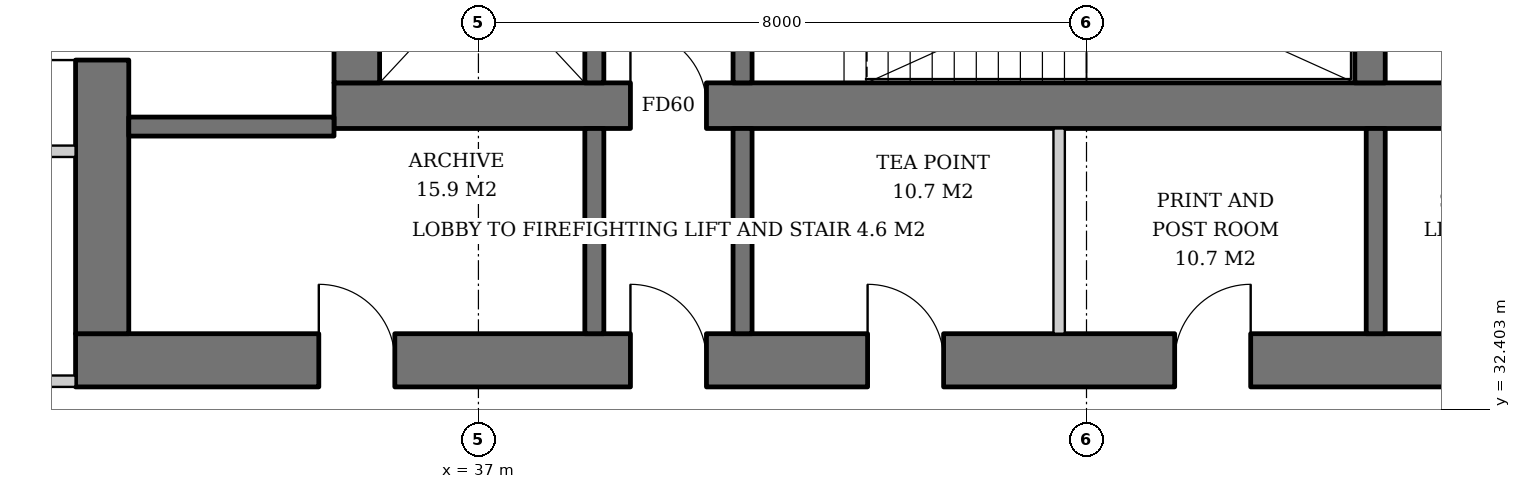
"""IFC4 building model, lengths in metres.
Left out: names, types, materials, properties, quantities, classifications, styles, units other than length and angle.
Written with IfcOpenShell. Run it as: python <this file> out.ifc"""

import sys

from ifc_helpers import new_model, si_unit, direction, frame, frame_2d, origin, place, context, subcontext, project, spatial, rectangle, extrude, element, fill, save


model = new_model("IFC4")
c1 = context("Model", 3, precision=1e-05, world=origin(), true_north=direction((0.0, 1.0)))
c2 = subcontext(c1, "Body", "Model", "MODEL_VIEW")
j1 = project(units=[si_unit("LENGTHUNIT", "METRE"), si_unit("PLANEANGLEUNIT", "RADIAN")], contexts=[c1])
p1 = place(None, origin())
s1 = spatial("IfcSite", under=j1, at=p1, CompositionType="ELEMENT")
p2 = place(p1, origin())
s2 = spatial("IfcBuilding", under=s1, at=p2, CompositionType="ELEMENT")
p3 = place(p2, frame((0.0, 0.0, 100.8)))
s3 = spatial("IfcBuildingStorey", under=s2, at=p3, CompositionType="ELEMENT", Elevation=100.8)
p4 = place(p3, frame((35.1, 36.4, 0.0), z_axis=(0.0, 0.0, 1.0), x_axis=(1.0, 0.0, 0.0)))
e1 = element("IfcWall", 1, at=p4, inside=s3, PredefinedType="SHEAR", context=c2, shape_type="SweptSolid", body=[
    extrude(rectangle(XDim=19.8, YDim=0.6, at=frame_2d((9.9, 0.0))), origin(), (0.0, 0.0, 1.0), 3.8),
])
p5 = place(p4, frame((3.9, 0.0, 0.0)))
e2 = element("IfcOpeningElement", 2, at=p5, cuts=e1, PredefinedType="OPENING", context=c2, shape_type="SweptSolid", body=[
    extrude(rectangle(XDim=1.0, YDim=2.1, at=frame_2d((0.5, 1.05))), frame((0.0, 0.31, 0.0), z_axis=(0.0, -1.0, 0.0), x_axis=(1.0, 0.0, 0.0)), (0.0, 0.0, 1.0), 0.62),
])
p6 = place(p4, frame((15.35, 0.0, 0.0)))
e3 = element("IfcOpeningElement", 3, at=p6, cuts=e1, PredefinedType="OPENING", context=c2, shape_type="SweptSolid", body=[
    extrude(rectangle(XDim=1.0, YDim=2.1, at=frame_2d((0.5, 1.05))), frame((0.0, 0.31, 0.0), z_axis=(0.0, -1.0, 0.0), x_axis=(1.0, 0.0, 0.0)), (0.0, 0.0, 1.0), 0.62),
])
p7 = place(p3, frame((35.4, 36.7, 0.0), z_axis=(0.0, 0.0, 1.0), x_axis=(0.0, 1.0, 0.0)))
e4 = element("IfcWall", 4, at=p7, inside=s3, PredefinedType="SHEAR", context=c2, shape_type="SweptSolid", body=[
    extrude(rectangle(XDim=18.6, YDim=0.6, at=frame_2d((9.3, 0.0))), origin(), (0.0, 0.0, 1.0), 3.8),
])
p8 = place(p7, frame((8.4, 0.0, 0.0)))
e5 = element("IfcOpeningElement", 5, at=p8, cuts=e4, PredefinedType="OPENING", context=c2, shape_type="SweptSolid", body=[
    extrude(rectangle(XDim=1.8, YDim=2.4, at=frame_2d((0.9, 1.2))), frame((0.0, 0.31, 0.0), z_axis=(0.0, -1.0, 0.0), x_axis=(1.0, 0.0, 0.0)), (0.0, 0.0, 1.0), 0.62),
])
p9 = place(p3, frame((31.7, 33.05, 0.0), z_axis=(0.0, 0.0, 1.0), x_axis=(1.0, 0.0, 0.0)))
e6 = element("IfcWall", 6, at=p9, inside=s3, PredefinedType="SHEAR", context=c2, shape_type="SweptSolid", body=[
    extrude(rectangle(XDim=26.6, YDim=0.7, at=frame_2d((13.3, 0.0))), origin(), (0.0, 0.0, 1.0), 3.8),
])
p10 = place(p9, frame((7.3, 0.0, 0.0)))
e7 = element("IfcOpeningElement", 7, at=p10, cuts=e6, PredefinedType="OPENING", context=c2, shape_type="SweptSolid", body=[
    extrude(rectangle(XDim=1.0, YDim=2.1, at=frame_2d((0.5, 1.05))), frame((0.0, 0.36, 0.0), z_axis=(0.0, -1.0, 0.0), x_axis=(1.0, 0.0, 0.0)), (0.0, 0.0, 1.0), 0.72),
])
p11 = place(p9, frame((18.75, 0.0, 0.0)))
e8 = element("IfcOpeningElement", 8, at=p11, cuts=e6, PredefinedType="OPENING", context=c2, shape_type="SweptSolid", body=[
    extrude(rectangle(XDim=1.0, YDim=2.1, at=frame_2d((0.5, 1.05))), frame((0.0, 0.36, 0.0), z_axis=(0.0, -1.0, 0.0), x_axis=(1.0, 0.0, 0.0)), (0.0, 0.0, 1.0), 0.72),
])
p12 = place(p9, frame((3.2, 0.0, 0.0)))
e9 = element("IfcOpeningElement", 9, at=p12, cuts=e6, PredefinedType="OPENING", context=c2, shape_type="SweptSolid", body=[
    extrude(rectangle(XDim=1.0, YDim=2.1, at=frame_2d((0.5, 1.05))), frame((0.0, 0.36, 0.0), z_axis=(0.0, -1.0, 0.0), x_axis=(1.0, 0.0, 0.0)), (0.0, 0.0, 1.0), 0.72),
])
p13 = place(p9, frame((10.42, 0.0, 0.0)))
e10 = element("IfcOpeningElement", 10, at=p13, cuts=e6, PredefinedType="OPENING", context=c2, shape_type="SweptSolid", body=[
    extrude(rectangle(XDim=1.0, YDim=2.1, at=frame_2d((0.5, 1.05))), frame((0.0, 0.36, 0.0), z_axis=(0.0, -1.0, 0.0), x_axis=(1.0, 0.0, 0.0)), (0.0, 0.0, 1.0), 0.72),
])
p14 = place(p9, frame((14.46, 0.0, 0.0)))
e11 = element("IfcOpeningElement", 11, at=p14, cuts=e6, PredefinedType="OPENING", context=c2, shape_type="SweptSolid", body=[
    extrude(rectangle(XDim=1.0, YDim=2.1, at=frame_2d((0.5, 1.05))), frame((0.0, 0.36, 0.0), z_axis=(0.0, -1.0, 0.0), x_axis=(1.0, 0.0, 0.0)), (0.0, 0.0, 1.0), 0.72),
])
p15 = place(p9, frame((22.5, 0.0, 0.0)))
e12 = element("IfcOpeningElement", 12, at=p15, cuts=e6, PredefinedType="OPENING", context=c2, shape_type="SweptSolid", body=[
    extrude(rectangle(XDim=1.0, YDim=2.1, at=frame_2d((0.5, 1.05))), frame((0.0, 0.36, 0.0), z_axis=(0.0, -1.0, 0.0), x_axis=(1.0, 0.0, 0.0)), (0.0, 0.0, 1.0), 0.72),
])
p16 = place(p3, frame((32.05, 33.4, 0.0), z_axis=(0.0, 0.0, 1.0), x_axis=(0.0, 1.0, 0.0)))
e13 = element("IfcWall", 13, at=p16, inside=s3, PredefinedType="SHEAR", context=c2, shape_type="SweptSolid", body=[
    extrude(rectangle(XDim=25.2, YDim=0.7, at=frame_2d((12.6, 0.0))), origin(), (0.0, 0.0, 1.0), 3.8),
])
p17 = place(p16, frame((11.7, 0.0, 0.0)))
e14 = element("IfcOpeningElement", 14, at=p17, cuts=e13, PredefinedType="OPENING", context=c2, shape_type="SweptSolid", body=[
    extrude(rectangle(XDim=1.8, YDim=2.4, at=frame_2d((0.9, 1.2))), frame((0.0, 0.36, 0.0), z_axis=(0.0, -1.0, 0.0), x_axis=(1.0, 0.0, 0.0)), (0.0, 0.0, 1.0), 0.72),
])
p18 = place(p16, frame((3.6, 0.0, 0.0)))
e15 = element("IfcOpeningElement", 15, at=p18, cuts=e13, PredefinedType="OPENING", context=c2, shape_type="SweptSolid", body=[
    extrude(rectangle(XDim=1.0, YDim=2.1, at=frame_2d((0.5, 1.05))), frame((0.0, 0.36, 0.0), z_axis=(0.0, -1.0, 0.0), x_axis=(1.0, 0.0, 0.0)), (0.0, 0.0, 1.0), 0.72),
])
p19 = place(p16, frame((6.35, 0.0, 0.0)))
e16 = element("IfcOpeningElement", 16, at=p19, cuts=e13, PredefinedType="OPENING", context=c2, shape_type="SweptSolid", body=[
    extrude(rectangle(XDim=1.0, YDim=2.1, at=frame_2d((0.5, 1.05))), frame((0.0, 0.36, 0.0), z_axis=(0.0, -1.0, 0.0), x_axis=(1.0, 0.0, 0.0)), (0.0, 0.0, 1.0), 0.72),
])
p20 = place(p16, frame((9.1, 0.0, 0.0)))
e17 = element("IfcOpeningElement", 17, at=p20, cuts=e13, PredefinedType="OPENING", context=c2, shape_type="SweptSolid", body=[
    extrude(rectangle(XDim=1.0, YDim=2.1, at=frame_2d((0.5, 1.05))), frame((0.0, 0.36, 0.0), z_axis=(0.0, -1.0, 0.0), x_axis=(1.0, 0.0, 0.0)), (0.0, 0.0, 1.0), 0.72),
])
p21 = place(p16, frame((15.1, 0.0, 0.0)))
e18 = element("IfcOpeningElement", 18, at=p21, cuts=e13, PredefinedType="OPENING", context=c2, shape_type="SweptSolid", body=[
    extrude(rectangle(XDim=1.0, YDim=2.1, at=frame_2d((0.5, 1.05))), frame((0.0, 0.36, 0.0), z_axis=(0.0, -1.0, 0.0), x_axis=(1.0, 0.0, 0.0)), (0.0, 0.0, 1.0), 0.72),
])
p22 = place(p16, frame((17.85, 0.0, 0.0)))
e19 = element("IfcOpeningElement", 19, at=p22, cuts=e13, PredefinedType="OPENING", context=c2, shape_type="SweptSolid", body=[
    extrude(rectangle(XDim=1.0, YDim=2.1, at=frame_2d((0.5, 1.05))), frame((0.0, 0.36, 0.0), z_axis=(0.0, -1.0, 0.0), x_axis=(1.0, 0.0, 0.0)), (0.0, 0.0, 1.0), 0.72),
])
p23 = place(p3, frame((48.73, 36.7, 0.0), z_axis=(0.0, 0.0, 1.0), x_axis=(0.0, 1.0, 0.0)))
e20 = element("IfcWall", 20, at=p23, inside=s3, PredefinedType="SHEAR", context=c2, shape_type="SweptSolid", body=[
    extrude(rectangle(XDim=2.9, YDim=0.4, at=frame_2d((1.45, 0.0))), origin(), (0.0, 0.0, 1.0), 3.8),
])
p24 = place(p3, frame((38.525, 36.7, 0.0), z_axis=(0.0, 0.0, 1.0), x_axis=(0.0, 1.0, 0.0)))
e21 = element("IfcWall", 21, at=p24, inside=s3, PredefinedType="SHEAR", context=c2, shape_type="SweptSolid", body=[
    extrude(rectangle(XDim=2.9, YDim=0.25, at=frame_2d((1.45, 0.0))), origin(), (0.0, 0.0, 1.0), 3.8),
])
p25 = place(p24, frame((0.8, 0.0, 0.0)))
e22 = element("IfcOpeningElement", 22, at=p25, cuts=e21, PredefinedType="OPENING", context=c2, shape_type="SweptSolid", body=[
    extrude(rectangle(XDim=1.3, YDim=2.2, at=frame_2d((0.65, 1.1))), frame((0.0, 0.135, 0.0), z_axis=(0.0, -1.0, 0.0), x_axis=(1.0, 0.0, 0.0)), (0.0, 0.0, 1.0), 0.27),
])
p26 = place(p3, frame((40.475, 36.7, 0.0), z_axis=(0.0, 0.0, 1.0), x_axis=(0.0, 1.0, 0.0)))
e23 = element("IfcWall", 23, at=p26, inside=s3, PredefinedType="SHEAR", context=c2, shape_type="SweptSolid", body=[
    extrude(rectangle(XDim=2.9, YDim=0.25, at=frame_2d((1.45, 0.0))), origin(), (0.0, 0.0, 1.0), 3.8),
])
p27 = place(p26, frame((0.75, 0.0, 0.0)))
e24 = element("IfcOpeningElement", 24, at=p27, cuts=e23, PredefinedType="OPENING", context=c2, shape_type="SweptSolid", body=[
    extrude(rectangle(XDim=1.2, YDim=2.1, at=frame_2d((0.6, 1.05))), frame((0.0, 0.135, 0.0), z_axis=(0.0, -1.0, 0.0), x_axis=(1.0, 0.0, 0.0)), (0.0, 0.0, 1.0), 0.27),
])
p28 = place(p3, frame((32.4, 36.125, 0.0), z_axis=(0.0, 0.0, 1.0), x_axis=(1.0, 0.0, 0.0)))
e25 = element("IfcWall", 25, at=p28, inside=s3, PredefinedType="SHEAR", context=c2, shape_type="SweptSolid", body=[
    extrude(rectangle(XDim=2.7, YDim=0.25, at=frame_2d((1.35, 0.0))), origin(), (0.0, 0.0, 1.0), 3.8),
])
for number, where, z_axis, x_axis in (
    (26, (38.525, 33.4, 0.0), (0.0, 0.0, 1.0), (0.0, 1.0, 0.0)),
    (27, (40.475, 33.4, 0.0), (0.0, 0.0, 1.0), (0.0, 1.0, 0.0)),
    (28, (48.805, 33.4, 0.0), (0.0, 0.0, 1.0), (0.0, 1.0, 0.0)),
):
    element("IfcWall", number, at=place(p3, frame(where, z_axis=z_axis, x_axis=x_axis)), inside=s3, PredefinedType="SOLIDWALL", context=c2, shape_type="SweptSolid", body=[
        extrude(rectangle(XDim=2.7, YDim=0.25, at=frame_2d((1.35, 0.0))), origin(), (0.0, 0.0, 1.0), 3.62),
    ])
p29 = place(p3, frame((44.64, 33.4, 0.0), z_axis=(0.0, 0.0, 1.0), x_axis=(0.0, 1.0, 0.0)))
e29 = element("IfcWall", 29, at=p29, inside=s3, PredefinedType="SOLIDWALL", context=c2, shape_type="SweptSolid", body=[
    extrude(rectangle(XDim=2.7, YDim=0.15, at=frame_2d((1.35, 0.0))), origin(), (0.0, 0.0, 1.0), 3.62),
])
for number, where, z_axis, x_axis in (
    (30, (31.7, 35.8, 0.0), (0.0, 0.0, 1.0), (-1.0, 0.0, 0.0)),
    (31, (31.7, 32.775, 0.0), (0.0, 0.0, 1.0), (-1.0, 0.0, 0.0)),
):
    element("IfcWall", number, at=place(p3, frame(where, z_axis=z_axis, x_axis=x_axis)), inside=s3, PredefinedType="PARTITIONING", context=c2, shape_type="SweptSolid", body=[
        extrude(rectangle(XDim=2.925, YDim=0.15, at=frame_2d((1.462, 0.0))), origin(), (0.0, 0.0, 1.0), 3.62),
    ])
p30 = place(p5, origin())
e32 = element("IfcDoor", 32, at=p30, inside=s3, OperationType="SINGLE_SWING_LEFT", PredefinedType="DOOR", context=c2, shape_type="SweptSolid", body=[
    extrude(rectangle(XDim=1.0, YDim=2.1, at=frame_2d((0.5, 1.05))), frame((0.0, 0.025, 0.0), z_axis=(0.0, -1.0, 0.0), x_axis=(1.0, 0.0, 0.0)), (0.0, 0.0, 1.0), 0.05),
])
fill(e2, e32)
p31 = place(p10, origin())
e33 = element("IfcDoor", 33, at=p31, inside=s3, OperationType="SINGLE_SWING_LEFT", PredefinedType="DOOR", context=c2, shape_type="SweptSolid", body=[
    extrude(rectangle(XDim=1.0, YDim=2.1, at=frame_2d((0.5, 1.05))), frame((0.0, 0.025, 0.0), z_axis=(0.0, -1.0, 0.0), x_axis=(1.0, 0.0, 0.0)), (0.0, 0.0, 1.0), 0.05),
])
fill(e7, e33)
p32 = place(p18, origin())
e34 = element("IfcDoor", 34, at=p32, inside=s3, OperationType="SINGLE_SWING_LEFT", PredefinedType="DOOR", context=c2, shape_type="SweptSolid", body=[
    extrude(rectangle(XDim=1.0, YDim=2.1, at=frame_2d((0.5, 1.05))), frame((0.0, -0.29, 0.0), z_axis=(0.0, -1.0, 0.0), x_axis=(1.0, 0.0, 0.0)), (0.0, 0.0, 1.0), 0.05),
])
fill(e15, e34)
p33 = place(p12, origin())
e35 = element("IfcDoor", 35, at=p33, inside=s3, OperationType="SINGLE_SWING_LEFT", PredefinedType="DOOR", context=c2, shape_type="SweptSolid", body=[
    extrude(rectangle(XDim=1.0, YDim=2.1, at=frame_2d((0.5, 1.05))), frame((0.0, 0.34, 0.0), z_axis=(0.0, -1.0, 0.0), x_axis=(1.0, 0.0, 0.0)), (0.0, 0.0, 1.0), 0.05),
])
fill(e9, e35)
p34 = place(p13, origin())
e36 = element("IfcDoor", 36, at=p34, inside=s3, OperationType="SINGLE_SWING_LEFT", PredefinedType="DOOR", context=c2, shape_type="SweptSolid", body=[
    extrude(rectangle(XDim=1.0, YDim=2.1, at=frame_2d((0.5, 1.05))), frame((0.0, 0.34, 0.0), z_axis=(0.0, -1.0, 0.0), x_axis=(1.0, 0.0, 0.0)), (0.0, 0.0, 1.0), 0.05),
])
fill(e10, e36)
p35 = place(p14, origin())
e37 = element("IfcDoor", 37, at=p35, inside=s3, OperationType="SINGLE_SWING_RIGHT", PredefinedType="DOOR", context=c2, shape_type="SweptSolid", body=[
    extrude(rectangle(XDim=1.0, YDim=2.1, at=frame_2d((0.5, 1.05))), frame((0.0, 0.34, 0.0), z_axis=(0.0, -1.0, 0.0), x_axis=(1.0, 0.0, 0.0)), (0.0, 0.0, 1.0), 0.05),
])
fill(e11, e37)
save(model, sys.argv[1])
